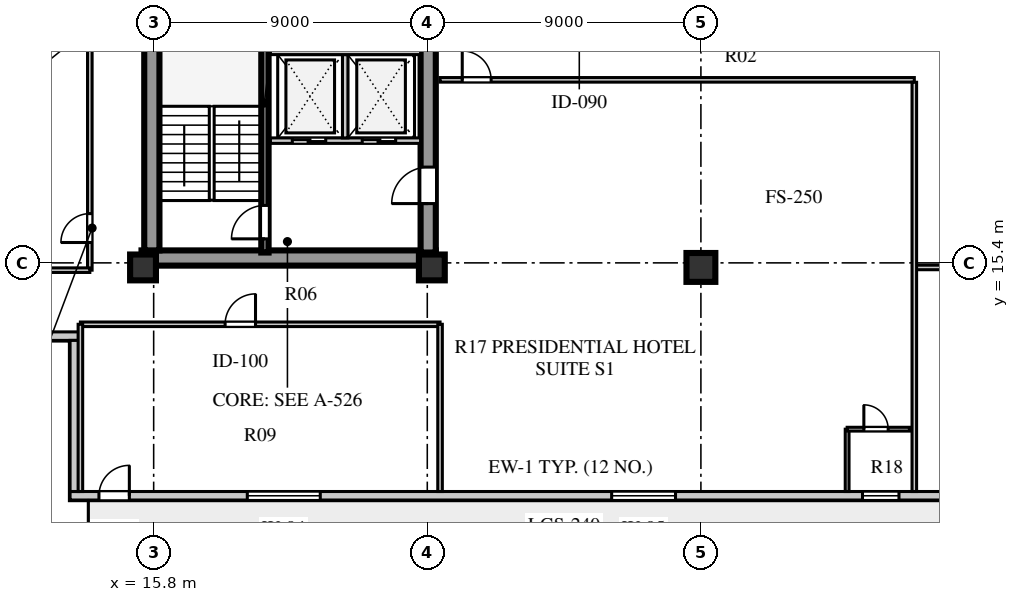
"""IFC4 building model, lengths in metres.
Left out: names, types, materials, properties, quantities, classifications, styles, units other than length and angle.
Written with IfcOpenShell. Run it as: python <this file> out.ifc"""

import sys

from ifc_helpers import new_model, si_unit, direction, frame, frame_2d, origin, origin_2d, place, context, subcontext, project, spatial, rectangle, extrude, element, fill, save


model = new_model("IFC4")
c1 = context("Model", 3, precision=1e-05, world=origin(), true_north=direction((0.0, 1.0)))
c2 = subcontext(c1, "Body", "Model", "MODEL_VIEW")
j1 = project(units=[si_unit("LENGTHUNIT", "METRE"), si_unit("PLANEANGLEUNIT", "RADIAN")], contexts=[c1])
p1 = place(None, origin())
s1 = spatial("IfcSite", under=j1, at=p1, CompositionType="ELEMENT")
p2 = place(p1, origin())
s2 = spatial("IfcBuilding", under=s1, at=p2, CompositionType="ELEMENT")
p3 = place(p2, frame((0.0, 0.0, 196.4)))
s3 = spatial("IfcBuildingStorey", under=s2, at=p3, CompositionType="ELEMENT", Elevation=196.4)
p4 = place(p3, frame((15.4, 15.56, 0.0), z_axis=(0.0, 0.0, 1.0), x_axis=(1.0, 0.0, 0.0)))
e1 = element("IfcWall", 1, at=p4, inside=s3, PredefinedType="SHEAR", context=c2, shape_type="SweptSolid", body=[
    extrude(rectangle(XDim=9.68, YDim=0.5, at=frame_2d((4.84, 0.0))), origin(), (0.0, 0.0, 1.0), 3.6),
])
p5 = place(p3, frame((15.74, 15.81, 0.0), z_axis=(0.0, 0.0, 1.0), x_axis=(0.0, 1.0, 0.0)))
e2 = element("IfcWall", 2, at=p5, inside=s3, PredefinedType="SHEAR", context=c2, shape_type="SweptSolid", body=[
    extrude(rectangle(XDim=25.63, YDim=0.5, at=frame_2d((12.815, 0.0))), origin(), (0.0, 0.0, 1.0), 3.6),
])
p6 = place(p3, frame((24.83, 15.74, 0.0), z_axis=(0.0, 0.0, 1.0), x_axis=(0.0, 1.0, 0.0)))
e3 = element("IfcWall", 3, at=p6, inside=s3, PredefinedType="SHEAR", context=c2, shape_type="SweptSolid", body=[
    extrude(rectangle(XDim=25.76, YDim=0.5, at=frame_2d((12.88, 0.0))), origin(), (0.0, 0.0, 1.0), 3.6),
])
p7 = place(p6, frame((1.61, 0.0, 0.0)))
e4 = element("IfcOpeningElement", 4, at=p7, cuts=e3, PredefinedType="OPENING", context=c2, shape_type="SweptSolid", body=[
    extrude(rectangle(XDim=1.2, YDim=2.1, at=frame_2d((0.6, 1.05))), frame((0.0, 0.26, 0.0), z_axis=(0.0, -1.0, 0.0), x_axis=(1.0, 0.0, 0.0)), (0.0, 0.0, 1.0), 0.52),
])
p8 = place(p6, frame((6.78, 0.0, 0.0)))
e5 = element("IfcOpeningElement", 5, at=p8, cuts=e3, PredefinedType="OPENING", context=c2, shape_type="SweptSolid", body=[
    extrude(rectangle(XDim=0.85, YDim=2.06, at=frame_2d((0.425, 1.03))), frame((0.0, 0.26, 0.0), z_axis=(0.0, -1.0, 0.0), x_axis=(1.0, 0.0, 0.0)), (0.0, 0.0, 1.0), 0.52),
])
p9 = place(p6, frame((12.11, 0.0, 0.0)))
e6 = element("IfcOpeningElement", 6, at=p9, cuts=e3, PredefinedType="OPENING", context=c2, shape_type="SweptSolid", body=[
    extrude(rectangle(XDim=1.5, YDim=2.12, at=frame_2d((0.75, 1.06))), frame((0.0, 0.26, 0.0), z_axis=(0.0, -1.0, 0.0), x_axis=(1.0, 0.0, 0.0)), (0.0, 0.0, 1.0), 0.52),
])
p10 = place(p6, frame((20.11, 0.0, 0.0)))
e7 = element("IfcOpeningElement", 7, at=p10, cuts=e3, PredefinedType="OPENING", context=c2, shape_type="SweptSolid", body=[
    extrude(rectangle(XDim=1.2, YDim=2.12, at=frame_2d((0.6, 1.06))), frame((0.0, 0.26, 0.0), z_axis=(0.0, -1.0, 0.0), x_axis=(1.0, 0.0, 0.0)), (0.0, 0.0, 1.0), 0.52),
])
p11 = place(p6, frame((24.01, 0.0, 0.0)))
e8 = element("IfcOpeningElement", 8, at=p11, cuts=e3, PredefinedType="OPENING", context=c2, shape_type="SweptSolid", body=[
    extrude(rectangle(XDim=0.95, YDim=2.1, at=frame_2d((0.475, 1.05))), frame((0.0, 0.26, 0.0), z_axis=(0.0, -1.0, 0.0), x_axis=(1.0, 0.0, 0.0)), (0.0, 0.0, 1.0), 0.52),
])
for number, where, z_axis, x_axis in (
    (9, (15.45, 15.25, 0.0), (0.0, 0.0, 1.0), (1.0, 0.0, 0.0)),
    (10, (24.95, 15.25, 0.0), (0.0, 0.0, 1.0), (1.0, 0.0, 0.0)),
):
    element("IfcColumn", number, at=place(p3, frame(where, z_axis=z_axis, x_axis=x_axis)), inside=s3, PredefinedType="COLUMN", context=c2, shape_type="SweptSolid", body=[
        extrude(rectangle(XDim=0.85, YDim=0.85, at=origin_2d()), origin(), (0.0, 0.0, 1.0), 3.6),
    ])
p12 = place(p3, frame((33.8, 15.25, 0.0), z_axis=(0.0, 0.0, 1.0), x_axis=(1.0, 0.0, 0.0)))
e11 = element("IfcColumn", 11, at=p12, inside=s3, PredefinedType="COLUMN", context=c2, shape_type="SweptSolid", body=[
    extrude(rectangle(XDim=0.95, YDim=0.95, at=origin_2d()), origin(), (0.0, 0.0, 1.0), 3.6),
])
p13 = place(p3, frame((13.05, 7.74, 0.0), z_axis=(0.0, 0.0, 1.0), x_axis=(1.0, 0.0, 0.0)))
e12 = element("IfcWall", 12, at=p13, inside=s3, PredefinedType="STANDARD", context=c2, shape_type="SweptSolid", body=[
    extrude(rectangle(XDim=32.5, YDim=0.28, at=frame_2d((16.25, 0.0))), origin(), (0.0, 0.0, 1.0), 3.6),
])
p14 = place(p13, frame((0.95, 0.0, 0.0)))
e13 = element("IfcOpeningElement", 13, at=p14, cuts=e12, PredefinedType="OPENING", context=c2, shape_type="SweptSolid", body=[
    extrude(rectangle(XDim=1.0, YDim=2.05, at=frame_2d((0.5, 1.025))), frame((0.0, 0.15, 0.0), z_axis=(0.0, -1.0, 0.0), x_axis=(1.0, 0.0, 0.0)), (0.0, 0.0, 1.0), 0.3),
])
p15 = place(p13, frame((5.83, 0.0, 0.8)))
e14 = element("IfcOpeningElement", 14, at=p15, cuts=e12, PredefinedType="OPENING", context=c2, shape_type="SweptSolid", body=[
    extrude(rectangle(XDim=2.4, YDim=2.05, at=frame_2d((1.2, 1.025))), frame((0.0, 0.15, 0.0), z_axis=(0.0, -1.0, 0.0), x_axis=(1.0, 0.0, 0.0)), (0.0, 0.0, 1.0), 0.3),
])
p16 = place(p13, frame((17.815, 0.0, 0.8)))
e15 = element("IfcOpeningElement", 15, at=p16, cuts=e12, PredefinedType="OPENING", context=c2, shape_type="SweptSolid", body=[
    extrude(rectangle(XDim=2.1, YDim=1.95, at=frame_2d((1.05, 0.975))), frame((0.0, 0.15, 0.0), z_axis=(0.0, -1.0, 0.0), x_axis=(1.0, 0.0, 0.0)), (0.0, 0.0, 1.0), 0.3),
])
p17 = place(p13, frame((26.065, 0.0, 0.8)))
e16 = element("IfcOpeningElement", 16, at=p17, cuts=e12, PredefinedType="OPENING", context=c2, shape_type="SweptSolid", body=[
    extrude(rectangle(XDim=1.2, YDim=1.75, at=frame_2d((0.6, 0.875))), frame((0.0, 0.15, 0.0), z_axis=(0.0, -1.0, 0.0), x_axis=(1.0, 0.0, 0.0)), (0.0, 0.0, 1.0), 0.3),
])
p18 = place(p13, frame((29.255, 0.0, 0.8)))
e17 = element("IfcOpeningElement", 17, at=p18, cuts=e12, PredefinedType="OPENING", context=c2, shape_type="SweptSolid", body=[
    extrude(rectangle(XDim=1.65, YDim=1.95, at=frame_2d((0.825, 0.975))), frame((0.0, 0.15, 0.0), z_axis=(0.0, -1.0, 0.0), x_axis=(1.0, 0.0, 0.0)), (0.0, 0.0, 1.0), 0.3),
])
p19 = place(p3, frame((7.8, 12.99, 0.0), z_axis=(0.0, 0.0, 1.0), x_axis=(1.0, 0.0, 0.0)))
e18 = element("IfcWall", 18, at=p19, inside=s3, PredefinedType="STANDARD", context=c2, shape_type="SweptSolid", body=[
    extrude(rectangle(XDim=5.53, YDim=0.28, at=frame_2d((2.765, 0.0))), origin(), (0.0, 0.0, 1.0), 3.6),
])
p20 = place(p3, frame((13.19, 12.85, 0.0), z_axis=(0.0, 0.0, 1.0), x_axis=(0.0, -1.0, 0.0)))
e19 = element("IfcWall", 19, at=p20, inside=s3, PredefinedType="STANDARD", context=c2, shape_type="SweptSolid", body=[
    extrude(rectangle(XDim=4.97, YDim=0.28, at=frame_2d((2.485, 0.0))), origin(), (0.0, 0.0, 1.0), 3.6),
])
p21 = place(p3, frame((19.46, 15.74, 0.0), z_axis=(0.0, 0.0, 1.0), x_axis=(0.0, 1.0, 0.0)))
e20 = element("IfcWall", 20, at=p21, inside=s3, PredefinedType="SHEAR", context=c2, shape_type="SweptSolid", body=[
    extrude(rectangle(XDim=8.2, YDim=0.24, at=frame_2d((4.1, 0.0))), origin(), (0.0, 0.0, 1.0), 3.85),
])
p22 = place(p21, frame((0.45, 0.0, 0.0)))
e21 = element("IfcOpeningElement", 21, at=p22, cuts=e20, PredefinedType="OPENING", context=c2, shape_type="SweptSolid", body=[
    extrude(rectangle(XDim=1.1, YDim=2.1, at=frame_2d((0.55, 1.05))), frame((0.0, 0.13, 0.0), z_axis=(0.0, -1.0, 0.0), x_axis=(1.0, 0.0, 0.0)), (0.0, 0.0, 1.0), 0.26),
])
p23 = place(p3, frame((19.64, 19.42, 0.0), z_axis=(0.0, 0.0, 1.0), x_axis=(1.0, 0.0, 0.0)))
e22 = element("IfcWall", 22, at=p23, inside=s3, PredefinedType="SOLIDWALL", context=c2, shape_type="SweptSolid", body=[
    extrude(rectangle(XDim=4.94, YDim=0.18, at=frame_2d((2.47, 0.0))), origin(), (0.0, 0.0, 1.0), 3.6),
])
p24 = place(p23, frame((0.72, 0.0, 0.0)))
e23 = element("IfcOpeningElement", 23, at=p24, cuts=e22, PredefinedType="OPENING", context=c2, shape_type="SweptSolid", body=[
    extrude(rectangle(XDim=1.1, YDim=2.1, at=frame_2d((0.55, 1.05))), frame((0.0, 0.1, 0.0), z_axis=(0.0, -1.0, 0.0), x_axis=(1.0, 0.0, 0.0)), (0.0, 0.0, 1.0), 0.2),
])
p25 = place(p23, frame((3.02, 0.0, 0.0)))
e24 = element("IfcOpeningElement", 24, at=p25, cuts=e22, PredefinedType="OPENING", context=c2, shape_type="SweptSolid", body=[
    extrude(rectangle(XDim=1.1, YDim=2.1, at=frame_2d((0.55, 1.05))), frame((0.0, 0.1, 0.0), z_axis=(0.0, -1.0, 0.0), x_axis=(1.0, 0.0, 0.0)), (0.0, 0.0, 1.0), 0.2),
])
p26 = place(p3, frame((22.1, 19.51, 0.0), z_axis=(0.0, 0.0, 1.0), x_axis=(0.0, 1.0, 0.0)))
e25 = element("IfcWall", 25, at=p26, inside=s3, PredefinedType="SOLIDWALL", context=c2, shape_type="SweptSolid", body=[
    extrude(rectangle(XDim=2.74, YDim=0.18, at=frame_2d((1.37, 0.0))), origin(), (0.0, 0.0, 1.0), 3.6),
])
p27 = place(p3, frame((19.64, 22.34, 0.0), z_axis=(0.0, 0.0, 1.0), x_axis=(1.0, 0.0, 0.0)))
e26 = element("IfcWall", 26, at=p27, inside=s3, PredefinedType="SOLIDWALL", context=c2, shape_type="SweptSolid", body=[
    extrude(rectangle(XDim=4.94, YDim=0.18, at=frame_2d((2.47, 0.0))), origin(), (0.0, 0.0, 1.0), 3.6),
])
p28 = place(p3, frame((25.22, 21.42, 0.0), z_axis=(0.0, 0.0, 1.0), x_axis=(1.0, 0.0, 0.0)))
e27 = element("IfcWall", 27, at=p28, inside=s3, PredefinedType="PARTITIONING", context=c2, shape_type="SweptSolid", body=[
    extrude(rectangle(XDim=15.6, YDim=0.15, at=frame_2d((7.8, 0.0))), origin(), (0.0, 0.0, 1.0), 3.25),
])
p29 = place(p28, frame((0.73, 0.0, 0.0)))
e28 = element("IfcOpeningElement", 28, at=p29, cuts=e27, PredefinedType="OPENING", context=c2, shape_type="SweptSolid", body=[
    extrude(rectangle(XDim=0.95, YDim=2.1, at=frame_2d((0.475, 1.05))), frame((0.0, 0.085, 0.0), z_axis=(0.0, -1.0, 0.0), x_axis=(1.0, 0.0, 0.0)), (0.0, 0.0, 1.0), 0.17),
])
p30 = place(p3, frame((40.82, 15.25, 0.0), z_axis=(0.0, 0.0, 1.0), x_axis=(1.0, 0.0, 0.0)))
e29 = element("IfcWall", 29, at=p30, inside=s3, PredefinedType="PARTITIONING", context=c2, shape_type="SweptSolid", body=[
    extrude(rectangle(XDim=9.7, YDim=0.15, at=frame_2d((4.85, 0.0))), origin(), (0.0, 0.0, 1.0), 2.95),
])
p31 = place(p3, frame((13.7, 15.16, 0.0), z_axis=(0.0, 0.0, 1.0), x_axis=(0.0, 1.0, 0.0)))
e30 = element("IfcWall", 30, at=p31, inside=s3, PredefinedType="PARTITIONING", context=c2, shape_type="SweptSolid", body=[
    extrude(rectangle(XDim=26.88, YDim=0.15, at=frame_2d((13.44, 0.0))), origin(), (0.0, 0.0, 1.0), 3.6),
])
p32 = place(p31, frame((0.91, 0.0, 0.0)))
e31 = element("IfcOpeningElement", 31, at=p32, cuts=e30, PredefinedType="OPENING", context=c2, shape_type="SweptSolid", body=[
    extrude(rectangle(XDim=0.95, YDim=2.1, at=frame_2d((0.475, 1.05))), frame((0.0, 0.085, 0.0), z_axis=(0.0, -1.0, 0.0), x_axis=(1.0, 0.0, 0.0)), (0.0, 0.0, 1.0), 0.17),
])
p33 = place(p31, frame((13.99, 0.0, 0.0)))
e32 = element("IfcOpeningElement", 32, at=p33, cuts=e30, PredefinedType="OPENING", context=c2, shape_type="SweptSolid", body=[
    extrude(rectangle(XDim=0.95, YDim=2.1, at=frame_2d((0.475, 1.05))), frame((0.0, 0.085, 0.0), z_axis=(0.0, -1.0, 0.0), x_axis=(1.0, 0.0, 0.0)), (0.0, 0.0, 1.0), 0.17),
])
p34 = place(p3, frame((8.08, 15.16, 0.0), z_axis=(0.0, 0.0, 1.0), x_axis=(1.0, 0.0, 0.0)))
e33 = element("IfcWall", 33, at=p34, inside=s3, PredefinedType="PARTITIONING", context=c2, shape_type="SweptSolid", body=[
    extrude(rectangle(XDim=5.62, YDim=0.15, at=frame_2d((2.81, 0.0))), origin(), (0.0, 0.0, 1.0), 3.15),
])
p35 = place(p3, frame((13.39, 13.38, 0.0), z_axis=(0.0, 0.0, 1.0), x_axis=(1.0, 0.0, 0.0)))
e34 = element("IfcWall", 34, at=p35, inside=s3, PredefinedType="PARTITIONING", context=c2, shape_type="SweptSolid", body=[
    extrude(rectangle(XDim=11.83, YDim=0.15, at=frame_2d((5.915, 0.0))), origin(), (0.0, 0.0, 1.0), 3.6),
])
p36 = place(p35, frame((4.76, 0.0, 0.0)))
e35 = element("IfcOpeningElement", 35, at=p36, cuts=e34, PredefinedType="OPENING", context=c2, shape_type="SweptSolid", body=[
    extrude(rectangle(XDim=1.0, YDim=2.08, at=frame_2d((0.5, 1.04))), frame((0.0, 0.085, 0.0), z_axis=(0.0, -1.0, 0.0), x_axis=(1.0, 0.0, 0.0)), (0.0, 0.0, 1.0), 0.17),
])
p37 = place(p3, frame((13.39, 7.88, 0.0), z_axis=(0.0, 0.0, 1.0), x_axis=(0.0, 1.0, 0.0)))
e36 = element("IfcWall", 36, at=p37, inside=s3, PredefinedType="PARTITIONING", context=c2, shape_type="SweptSolid", body=[
    extrude(rectangle(XDim=5.5, YDim=0.15, at=frame_2d((2.75, 0.0))), origin(), (0.0, 0.0, 1.0), 3.6),
])
p38 = place(p3, frame((25.22, 7.88, 0.0), z_axis=(0.0, 0.0, 1.0), x_axis=(0.0, 1.0, 0.0)))
e37 = element("IfcWall", 37, at=p38, inside=s3, PredefinedType="PARTITIONING", context=c2, shape_type="SweptSolid", body=[
    extrude(rectangle(XDim=5.5, YDim=0.15, at=frame_2d((2.75, 0.0))), origin(), (0.0, 0.0, 1.0), 3.15),
])
p39 = place(p3, frame((40.82, 7.88, 0.0), z_axis=(0.0, 0.0, 1.0), x_axis=(0.0, 1.0, 0.0)))
e38 = element("IfcWall", 38, at=p39, inside=s3, PredefinedType="PARTITIONING", context=c2, shape_type="SweptSolid", body=[
    extrude(rectangle(XDim=13.46, YDim=0.15, at=frame_2d((6.73, 0.0))), origin(), (0.0, 0.0, 1.0), 3.6),
])
p40 = place(p3, frame((38.61, 7.88, 0.0), z_axis=(0.0, 0.0, 1.0), x_axis=(0.0, 1.0, 0.0)))
e39 = element("IfcWall", 39, at=p40, inside=s3, PredefinedType="PLUMBINGWALL", context=c2, shape_type="SweptSolid", body=[
    extrude(rectangle(XDim=2.05, YDim=0.125, at=frame_2d((1.025, 0.0))), origin(), (0.0, 0.0, 1.0), 3.6),
])
p41 = place(p3, frame((38.61, 9.93, 0.0), z_axis=(0.0, 0.0, 1.0), x_axis=(1.0, 0.0, 0.0)))
e40 = element("IfcWall", 40, at=p41, inside=s3, PredefinedType="PLUMBINGWALL", context=c2, shape_type="SweptSolid", body=[
    extrude(rectangle(XDim=2.05, YDim=0.125, at=frame_2d((1.025, 0.0))), origin(), (0.0, 0.0, 1.0), 3.6),
])
p42 = place(p41, frame((0.55, 0.0, 0.0)))
e41 = element("IfcOpeningElement", 41, at=p42, cuts=e40, PredefinedType="OPENING", context=c2, shape_type="SweptSolid", body=[
    extrude(rectangle(XDim=0.8, YDim=2.05, at=frame_2d((0.4, 1.025))), frame((0.0, 0.073, 0.0), z_axis=(0.0, -1.0, 0.0), x_axis=(1.0, 0.0, 0.0)), (0.0, 0.0, 1.0), 0.145),
])
p43 = place(p14, frame((1.0, 0.0, 0.0), z_axis=(0.0, 0.0, 1.0), x_axis=(-1.0, 0.0, 0.0)))
e42 = element("IfcDoor", 42, at=p43, inside=s3, OperationType="SINGLE_SWING_LEFT", PredefinedType="DOOR", context=c2, shape_type="SweptSolid", body=[
    extrude(rectangle(XDim=1.0, YDim=2.05, at=frame_2d((0.5, 1.025))), frame((0.0, 0.025, 0.0), z_axis=(0.0, -1.0, 0.0), x_axis=(1.0, 0.0, 0.0)), (0.0, 0.0, 1.0), 0.05),
])
fill(e13, e42)
p44 = place(p15, origin())
e43 = element("IfcWindow", 43, at=p44, inside=s3, PartitioningType="SINGLE_PANEL", PredefinedType="WINDOW", context=c2, shape_type="SweptSolid", body=[
    extrude(rectangle(XDim=2.4, YDim=2.05, at=frame_2d((1.2, 1.025))), frame((0.0, 0.03, 0.0), z_axis=(0.0, -1.0, 0.0), x_axis=(1.0, 0.0, 0.0)), (0.0, 0.0, 1.0), 0.06),
])
fill(e14, e43)
p45 = place(p16, origin())
e44 = element("IfcWindow", 44, at=p45, inside=s3, PartitioningType="SINGLE_PANEL", PredefinedType="WINDOW", context=c2, shape_type="SweptSolid", body=[
    extrude(rectangle(XDim=2.1, YDim=1.95, at=frame_2d((1.05, 0.975))), frame((0.0, 0.03, 0.0), z_axis=(0.0, -1.0, 0.0), x_axis=(1.0, 0.0, 0.0)), (0.0, 0.0, 1.0), 0.06),
])
fill(e15, e44)
p46 = place(p17, origin())
e45 = element("IfcWindow", 45, at=p46, inside=s3, PartitioningType="SINGLE_PANEL", PredefinedType="WINDOW", context=c2, shape_type="SweptSolid", body=[
    extrude(rectangle(XDim=1.2, YDim=1.75, at=frame_2d((0.6, 0.875))), frame((0.0, 0.03, 0.0), z_axis=(0.0, -1.0, 0.0), x_axis=(1.0, 0.0, 0.0)), (0.0, 0.0, 1.0), 0.06),
])
fill(e16, e45)
p47 = place(p22, origin())
e46 = element("IfcDoor", 46, at=p47, inside=s3, OperationType="SINGLE_SWING_LEFT", PredefinedType="DOOR", context=c2, shape_type="SweptSolid", body=[
    extrude(rectangle(XDim=1.1, YDim=2.1, at=frame_2d((0.55, 1.05))), frame((0.0, 0.025, 0.0), z_axis=(0.0, -1.0, 0.0), x_axis=(1.0, 0.0, 0.0)), (0.0, 0.0, 1.0), 0.05),
])
fill(e21, e46)
p48 = place(p24, origin())
e47 = element("IfcDoor", 47, at=p48, inside=s3, OperationType="DOUBLE_DOOR_SLIDING", PredefinedType="DOOR", context=c2, shape_type="SweptSolid", body=[
    extrude(rectangle(XDim=1.1, YDim=2.1, at=frame_2d((0.55, 1.05))), frame((0.0, 0.025, 0.0), z_axis=(0.0, -1.0, 0.0), x_axis=(1.0, 0.0, 0.0)), (0.0, 0.0, 1.0), 0.05),
])
fill(e23, e47)
p49 = place(p25, origin())
e48 = element("IfcDoor", 48, at=p49, inside=s3, OperationType="DOUBLE_DOOR_SLIDING", PredefinedType="DOOR", context=c2, shape_type="SweptSolid", body=[
    extrude(rectangle(XDim=1.1, YDim=2.1, at=frame_2d((0.55, 1.05))), frame((0.0, 0.025, 0.0), z_axis=(0.0, -1.0, 0.0), x_axis=(1.0, 0.0, 0.0)), (0.0, 0.0, 1.0), 0.05),
])
fill(e24, e48)
p50 = place(p7, frame((1.2, 0.0, 0.0), z_axis=(0.0, 0.0, 1.0), x_axis=(-1.0, 0.0, 0.0)))
e49 = element("IfcDoor", 49, at=p50, inside=s3, OperationType="SINGLE_SWING_RIGHT", PredefinedType="DOOR", context=c2, shape_type="SweptSolid", body=[
    extrude(rectangle(XDim=1.2, YDim=2.1, at=frame_2d((0.6, 1.05))), frame((0.0, 0.025, 0.0), z_axis=(0.0, -1.0, 0.0), x_axis=(1.0, 0.0, 0.0)), (0.0, 0.0, 1.0), 0.05),
])
fill(e4, e49)
p51 = place(p36, frame((1.0, 0.0, 0.0), z_axis=(0.0, 0.0, 1.0), x_axis=(-1.0, 0.0, 0.0)))
e50 = element("IfcDoor", 50, at=p51, inside=s3, OperationType="SINGLE_SWING_LEFT", PredefinedType="DOOR", context=c2, shape_type="SweptSolid", body=[
    extrude(rectangle(XDim=1.0, YDim=2.08, at=frame_2d((0.5, 1.04))), frame((0.0, 0.025, 0.0), z_axis=(0.0, -1.0, 0.0), x_axis=(1.0, 0.0, 0.0)), (0.0, 0.0, 1.0), 0.05),
])
fill(e35, e50)
p52 = place(p32, origin())
e51 = element("IfcDoor", 51, at=p52, inside=s3, OperationType="SINGLE_SWING_LEFT", PredefinedType="DOOR", context=c2, shape_type="SweptSolid", body=[
    extrude(rectangle(XDim=0.95, YDim=2.1, at=frame_2d((0.475, 1.05))), frame((0.0, 0.025, 0.0), z_axis=(0.0, -1.0, 0.0), x_axis=(1.0, 0.0, 0.0)), (0.0, 0.0, 1.0), 0.05),
])
fill(e31, e51)
p53 = place(p29, frame((0.95, 0.0, 0.0), z_axis=(0.0, 0.0, 1.0), x_axis=(-1.0, 0.0, 0.0)))
e52 = element("IfcDoor", 52, at=p53, inside=s3, OperationType="SINGLE_SWING_RIGHT", PredefinedType="DOOR", context=c2, shape_type="SweptSolid", body=[
    extrude(rectangle(XDim=0.95, YDim=2.1, at=frame_2d((0.475, 1.05))), frame((0.0, 0.025, 0.0), z_axis=(0.0, -1.0, 0.0), x_axis=(1.0, 0.0, 0.0)), (0.0, 0.0, 1.0), 0.05),
])
fill(e28, e52)
p54 = place(p42, origin())
e53 = element("IfcDoor", 53, at=p54, inside=s3, OperationType="SINGLE_SWING_LEFT", PredefinedType="DOOR", context=c2, shape_type="SweptSolid", body=[
    extrude(rectangle(XDim=0.8, YDim=2.05, at=frame_2d((0.4, 1.025))), frame((0.0, 0.025, 0.0), z_axis=(0.0, -1.0, 0.0), x_axis=(1.0, 0.0, 0.0)), (0.0, 0.0, 1.0), 0.05),
])
fill(e41, e53)
save(model, sys.argv[1])
